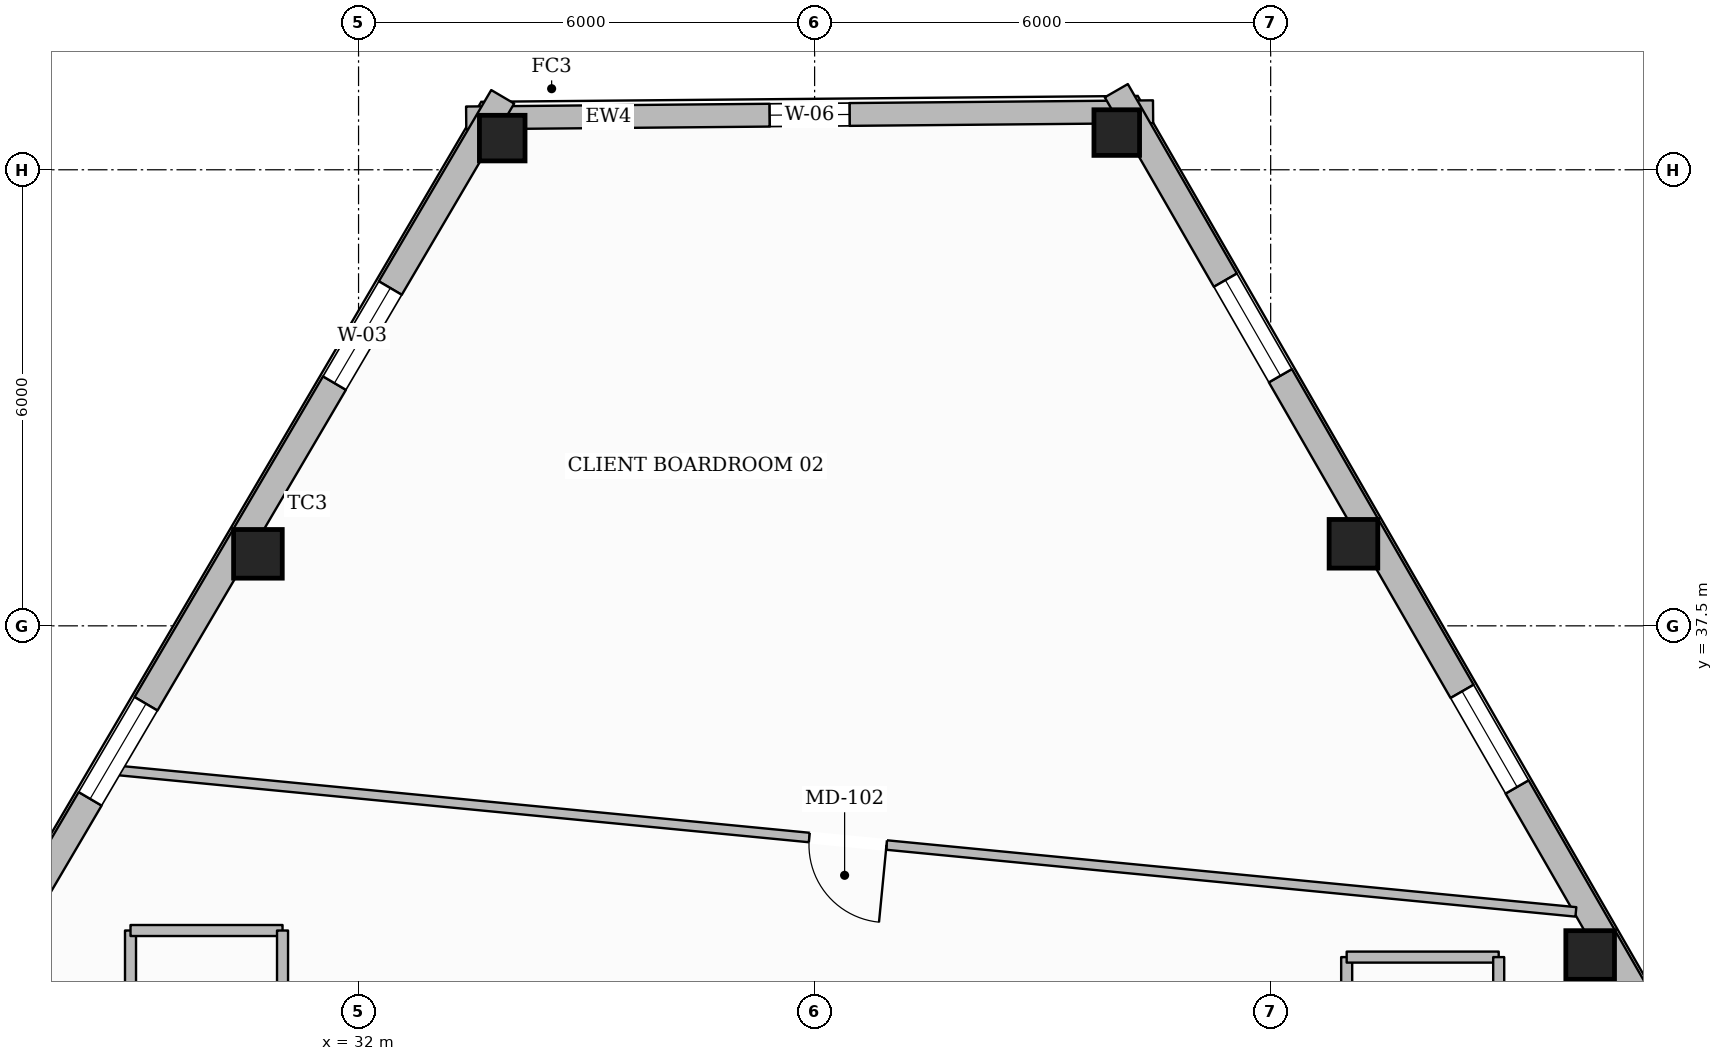
"""IFC4 building model, lengths in metres.
Left out: names, types, materials, properties, quantities, classifications, styles, units other than length and angle.
Written with IfcOpenShell. Run it as: python <this file> out.ifc"""

import sys

from ifc_helpers import new_model, si_unit, direction, frame, frame_2d, origin, origin_2d, place, context, subcontext, project, spatial, rectangle, hollow_rectangle, extrude, element, fill, save


model = new_model("IFC4")
c1 = context("Model", 3, precision=1e-05, world=origin(), true_north=direction((0.0, 1.0)))
c2 = subcontext(c1, "Body", "Model", "MODEL_VIEW")
j1 = project(units=[si_unit("LENGTHUNIT", "METRE"), si_unit("PLANEANGLEUNIT", "RADIAN")], contexts=[c1])
p1 = place(None, origin())
s1 = spatial("IfcSite", under=j1, at=p1, CompositionType="ELEMENT")
p2 = place(p1, origin())
s2 = spatial("IfcBuilding", under=s1, at=p2, CompositionType="ELEMENT")
p3 = place(p2, frame((0.0, 0.0, 215.05)))
s3 = spatial("IfcBuildingStorey", under=s2, at=p3, CompositionType="ELEMENT", Elevation=215.05)
p4 = place(p3, frame((33.89, 43.917, 0.0), z_axis=(0.0, 0.0, 1.0), x_axis=(1.0, 0.0, 0.0)))
e1 = element("IfcColumn", 1, at=p4, inside=s3, PredefinedType="COLUMN", context=c2, shape_type="SweptSolid", body=[
    extrude(hollow_rectangle(XDim=0.6, YDim=0.6, WallThickness=0.028, at=origin_2d()), origin(), (0.0, 0.0, 1.0), 3.6),
])
for number, where, z_axis, x_axis in (
    (2, (30.676, 38.447, 0.0), (0.0, 0.0, 1.0), (1.0, 0.0, 0.0)),
    (3, (48.203, 33.17, 0.0), (0.0, 0.0, 1.0), (1.0, 0.0, 0.0)),
    (4, (45.089, 38.58, 0.0), (0.0, 0.0, 1.0), (1.0, 0.0, 0.0)),
):
    element("IfcColumn", number, at=place(p3, frame(where, z_axis=z_axis, x_axis=x_axis)), inside=s3, PredefinedType="COLUMN", context=c2, shape_type="SweptSolid", body=[
        extrude(hollow_rectangle(XDim=0.64, YDim=0.64, WallThickness=0.028, at=origin_2d()), origin(), (0.0, 0.0, 1.0), 3.6),
    ])
p5 = place(p3, frame((41.975, 43.989, 0.0), z_axis=(0.0, 0.0, 1.0), x_axis=(1.0, 0.0, 0.0)))
e5 = element("IfcColumn", 5, at=p5, inside=s3, PredefinedType="COLUMN", context=c2, shape_type="SweptSolid", body=[
    extrude(hollow_rectangle(XDim=0.6, YDim=0.6, WallThickness=0.028, at=origin_2d()), origin(), (0.0, 0.0, 1.0), 3.6),
])
p6 = place(p3, frame((33.416, 44.182, 0.0), z_axis=(0.0, 0.0, 1.0), x_axis=(0.99995953746, 0.008995745785, 0.0)))
e6 = element("IfcWall", 6, at=p6, inside=s3, PredefinedType="STANDARD", context=c2, shape_type="SweptSolid", body=[
    extrude(rectangle(XDim=9.037, YDim=0.3, at=frame_2d((4.519, 0.0))), origin(), (0.0, 0.0, 1.0), 3.132),
])
p7 = place(p6, frame((3.994, 0.0, 0.65)))
e7 = element("IfcOpeningElement", 7, at=p7, cuts=e6, PredefinedType="OPENING", context=c2, shape_type="SweptSolid", body=[
    extrude(rectangle(XDim=1.05, YDim=1.7, at=frame_2d((0.525, 0.85))), frame((0.0, 0.16, 0.0), z_axis=(0.0, -1.0, 0.0), x_axis=(1.0, 0.0, 0.0)), (0.0, 0.0, 1.0), 0.32),
])
p8 = place(p3, frame((14.13, 10.825, 0.0), z_axis=(0.0, 0.0, 1.0), x_axis=(0.506658543763, 0.862146808863, 0.0)))
e8 = element("IfcWall", 8, at=p8, inside=s3, PredefinedType="STANDARD", context=c2, shape_type="SweptSolid", body=[
    extrude(rectangle(XDim=39.014, YDim=0.35, at=frame_2d((19.507, 0.0))), origin(), (0.0, 0.0, 1.0), 3.132),
])
p9 = place(p8, frame((9.354, 0.0, 0.0)))
e9 = element("IfcOpeningElement", 9, at=p9, cuts=e8, PredefinedType="OPENING", context=c2, shape_type="SweptSolid", body=[
    extrude(rectangle(XDim=1.0, YDim=2.2, at=frame_2d((0.5, 1.1))), frame((0.0, 0.185, 0.0), z_axis=(0.0, -1.0, 0.0), x_axis=(1.0, 0.0, 0.0)), (0.0, 0.0, 1.0), 0.37),
])
p10 = place(p8, frame((34.645, 0.0, 0.65)))
e10 = element("IfcOpeningElement", 10, at=p10, cuts=e8, PredefinedType="OPENING", context=c2, shape_type="SweptSolid", body=[
    extrude(rectangle(XDim=1.45, YDim=1.75, at=frame_2d((0.725, 0.875))), frame((0.0, 0.185, 0.0), z_axis=(0.0, -1.0, 0.0), x_axis=(1.0, 0.0, 0.0)), (0.0, 0.0, 1.0), 0.37),
])
p11 = place(p8, frame((28.301, 0.0, 0.65)))
e11 = element("IfcOpeningElement", 11, at=p11, cuts=e8, PredefinedType="OPENING", context=c2, shape_type="SweptSolid", body=[
    extrude(rectangle(XDim=1.45, YDim=1.75, at=frame_2d((0.725, 0.875))), frame((0.0, 0.185, 0.0), z_axis=(0.0, -1.0, 0.0), x_axis=(1.0, 0.0, 0.0)), (0.0, 0.0, 1.0), 0.37),
])
p12 = place(p8, frame((21.958, 0.0, 0.65)))
e12 = element("IfcOpeningElement", 12, at=p12, cuts=e8, PredefinedType="OPENING", context=c2, shape_type="SweptSolid", body=[
    extrude(rectangle(XDim=1.45, YDim=1.75, at=frame_2d((0.725, 0.875))), frame((0.0, 0.185, 0.0), z_axis=(0.0, -1.0, 0.0), x_axis=(1.0, 0.0, 0.0)), (0.0, 0.0, 1.0), 0.37),
])
p13 = place(p8, frame((2.926, 0.0, 0.65)))
e13 = element("IfcOpeningElement", 13, at=p13, cuts=e8, PredefinedType="OPENING", context=c2, shape_type="SweptSolid", body=[
    extrude(rectangle(XDim=1.45, YDim=1.75, at=frame_2d((0.725, 0.875))), frame((0.0, 0.185, 0.0), z_axis=(0.0, -1.0, 0.0), x_axis=(1.0, 0.0, 0.0)), (0.0, 0.0, 1.0), 0.37),
])
p14 = place(p3, frame((41.969, 44.54, 0.0), z_axis=(0.0, 0.0, 1.0), x_axis=(0.498884596562, -0.866668425243, 0.0)))
e14 = element("IfcWall", 14, at=p14, inside=s3, PredefinedType="STANDARD", context=c2, shape_type="SweptSolid", body=[
    extrude(rectangle(XDim=38.412, YDim=0.35, at=frame_2d((19.206, 0.0))), origin(), (0.0, 0.0, 1.0), 3.132),
])
p15 = place(p14, frame((34.087, 0.0, 0.65)))
e15 = element("IfcOpeningElement", 15, at=p15, cuts=e14, PredefinedType="OPENING", context=c2, shape_type="SweptSolid", body=[
    extrude(rectangle(XDim=1.45, YDim=1.75, at=frame_2d((0.725, 0.875))), frame((0.0, 0.185, 0.0), z_axis=(0.0, -1.0, 0.0), x_axis=(1.0, 0.0, 0.0)), (0.0, 0.0, 1.0), 0.37),
])
p16 = place(p14, frame((27.845, 0.0, 0.65)))
e16 = element("IfcOpeningElement", 16, at=p16, cuts=e14, PredefinedType="OPENING", context=c2, shape_type="SweptSolid", body=[
    extrude(rectangle(XDim=1.45, YDim=1.75, at=frame_2d((0.725, 0.875))), frame((0.0, 0.185, 0.0), z_axis=(0.0, -1.0, 0.0), x_axis=(1.0, 0.0, 0.0)), (0.0, 0.0, 1.0), 0.37),
])
p17 = place(p14, frame((21.603, 0.0, 0.65)))
e17 = element("IfcOpeningElement", 17, at=p17, cuts=e14, PredefinedType="OPENING", context=c2, shape_type="SweptSolid", body=[
    extrude(rectangle(XDim=1.45, YDim=1.75, at=frame_2d((0.725, 0.875))), frame((0.0, 0.185, 0.0), z_axis=(0.0, -1.0, 0.0), x_axis=(1.0, 0.0, 0.0)), (0.0, 0.0, 1.0), 0.37),
])
p18 = place(p14, frame((9.119, 0.0, 0.65)))
e18 = element("IfcOpeningElement", 18, at=p18, cuts=e14, PredefinedType="OPENING", context=c2, shape_type="SweptSolid", body=[
    extrude(rectangle(XDim=1.45, YDim=1.75, at=frame_2d((0.725, 0.875))), frame((0.0, 0.185, 0.0), z_axis=(0.0, -1.0, 0.0), x_axis=(1.0, 0.0, 0.0)), (0.0, 0.0, 1.0), 0.37),
])
p19 = place(p14, frame((2.876, 0.0, 0.65)))
e19 = element("IfcOpeningElement", 19, at=p19, cuts=e14, PredefinedType="OPENING", context=c2, shape_type="SweptSolid", body=[
    extrude(rectangle(XDim=1.45, YDim=1.75, at=frame_2d((0.725, 0.875))), frame((0.0, 0.185, 0.0), z_axis=(0.0, -1.0, 0.0), x_axis=(1.0, 0.0, 0.0)), (0.0, 0.0, 1.0), 0.37),
])
p20 = place(p3, frame((29.0, 25.02, 0.0), z_axis=(0.0, 0.0, 1.0), x_axis=(0.0, 1.0, 0.0)))
e20 = element("IfcWall", 20, at=p20, inside=s3, PredefinedType="PARTITIONING", context=c2, shape_type="SweptSolid", body=[
    extrude(rectangle(XDim=8.472, YDim=0.145, at=frame_2d((4.236, 0.0))), origin(), (0.0, 0.0, 1.0), 3.6),
])
p21 = place(p20, frame((2.347, 0.0, 0.0)))
e21 = element("IfcOpeningElement", 21, at=p21, cuts=e20, PredefinedType="OPENING", context=c2, shape_type="SweptSolid", body=[
    extrude(rectangle(XDim=0.98, YDim=2.15, at=frame_2d((0.49, 1.075))), frame((0.0, 0.083, 0.0), z_axis=(0.0, -1.0, 0.0), x_axis=(1.0, 0.0, 0.0)), (0.0, 0.0, 1.0), 0.165),
])
p22 = place(p3, frame((29.0, 33.492, 0.0), z_axis=(0.0, 0.0, 1.0), x_axis=(1.0, 0.0, 0.0)))
e22 = element("IfcWall", 22, at=p22, inside=s3, PredefinedType="PARTITIONING", context=c2, shape_type="SweptSolid", body=[
    extrude(rectangle(XDim=2.0, YDim=0.145, at=frame_2d((1.0, 0.0))), origin(), (0.0, 0.0, 1.0), 3.6),
])
p23 = place(p3, frame((31.0, 33.492, 0.0), z_axis=(0.0, 0.0, 1.0), x_axis=(0.0, -1.0, 0.0)))
e23 = element("IfcWall", 23, at=p23, inside=s3, PredefinedType="PARTITIONING", context=c2, shape_type="SweptSolid", body=[
    extrude(rectangle(XDim=8.472, YDim=0.145, at=frame_2d((4.236, 0.0))), origin(), (0.0, 0.0, 1.0), 3.6),
])
p24 = place(p3, frame((45.0, 25.02, 0.0), z_axis=(0.0, 0.0, 1.0), x_axis=(0.0, 1.0, 0.0)))
e24 = element("IfcWall", 24, at=p24, inside=s3, PredefinedType="PARTITIONING", context=c2, shape_type="SweptSolid", body=[
    extrude(rectangle(XDim=8.122, YDim=0.145, at=frame_2d((4.061, 0.0))), origin(), (0.0, 0.0, 1.0), 3.141),
])
p25 = place(p24, frame((3.361, 0.0, 0.0)))
e25 = element("IfcOpeningElement", 25, at=p25, cuts=e24, PredefinedType="OPENING", context=c2, shape_type="SweptSolid", body=[
    extrude(rectangle(XDim=1.4, YDim=2.2, at=frame_2d((0.7, 1.1))), frame((0.0, 0.083, 0.0), z_axis=(0.0, -1.0, 0.0), x_axis=(1.0, 0.0, 0.0)), (0.0, 0.0, 1.0), 0.165),
])
p26 = place(p3, frame((45.0, 33.142, 0.0), z_axis=(0.0, 0.0, 1.0), x_axis=(1.0, 0.0, 0.0)))
e26 = element("IfcWall", 26, at=p26, inside=s3, PredefinedType="PARTITIONING", context=c2, shape_type="SweptSolid", body=[
    extrude(rectangle(XDim=2.0, YDim=0.145, at=frame_2d((1.0, 0.0))), origin(), (0.0, 0.0, 1.0), 3.6),
])
p27 = place(p3, frame((47.0, 33.142, 0.0), z_axis=(0.0, 0.0, 1.0), x_axis=(0.0, -1.0, 0.0)))
e27 = element("IfcWall", 27, at=p27, inside=s3, PredefinedType="PARTITIONING", context=c2, shape_type="SweptSolid", body=[
    extrude(rectangle(XDim=8.122, YDim=0.145, at=frame_2d((4.061, 0.0))), origin(), (0.0, 0.0, 1.0), 3.141),
])
p28 = place(p3, frame((48.015, 33.737, 0.0), z_axis=(0.0, 0.0, 1.0), x_axis=(-0.995325183531, 0.096580427779, 0.0)))
e28 = element("IfcWall", 28, at=p28, inside=s3, PredefinedType="PARTITIONING", context=c2, shape_type="SweptSolid", body=[
    extrude(rectangle(XDim=19.244, YDim=0.125, at=frame_2d((9.622, 0.0))), origin(), (0.0, 0.0, 1.0), 3.6),
])
p29 = place(p28, frame((9.112, 0.0, 0.0)))
e29 = element("IfcOpeningElement", 29, at=p29, cuts=e28, PredefinedType="OPENING", context=c2, shape_type="SweptSolid", body=[
    extrude(rectangle(XDim=1.02, YDim=2.15, at=frame_2d((0.51, 1.075))), frame((0.0, 0.073, 0.0), z_axis=(0.0, -1.0, 0.0), x_axis=(1.0, 0.0, 0.0)), (0.0, 0.0, 1.0), 0.145),
])
p30 = place(p10, origin())
e30 = element("IfcWindow", 30, at=p30, inside=s3, PartitioningType="SINGLE_PANEL", PredefinedType="WINDOW", context=c2, shape_type="SweptSolid", body=[
    extrude(rectangle(XDim=1.45, YDim=1.75, at=frame_2d((0.725, 0.875))), frame((0.0, 0.03, 0.0), z_axis=(0.0, -1.0, 0.0), x_axis=(1.0, 0.0, 0.0)), (0.0, 0.0, 1.0), 0.06),
])
fill(e10, e30)
p31 = place(p11, origin())
e31 = element("IfcWindow", 31, at=p31, inside=s3, PartitioningType="SINGLE_PANEL", PredefinedType="WINDOW", context=c2, shape_type="SweptSolid", body=[
    extrude(rectangle(XDim=1.45, YDim=1.75, at=frame_2d((0.725, 0.875))), frame((0.0, 0.03, 0.0), z_axis=(0.0, -1.0, 0.0), x_axis=(1.0, 0.0, 0.0)), (0.0, 0.0, 1.0), 0.06),
])
fill(e11, e31)
p32 = place(p18, origin())
e32 = element("IfcWindow", 32, at=p32, inside=s3, PartitioningType="SINGLE_PANEL", PredefinedType="WINDOW", context=c2, shape_type="SweptSolid", body=[
    extrude(rectangle(XDim=1.45, YDim=1.75, at=frame_2d((0.725, 0.875))), frame((0.0, 0.03, 0.0), z_axis=(0.0, -1.0, 0.0), x_axis=(1.0, 0.0, 0.0)), (0.0, 0.0, 1.0), 0.06),
])
fill(e18, e32)
p33 = place(p19, origin())
e33 = element("IfcWindow", 33, at=p33, inside=s3, PartitioningType="SINGLE_PANEL", PredefinedType="WINDOW", context=c2, shape_type="SweptSolid", body=[
    extrude(rectangle(XDim=1.45, YDim=1.75, at=frame_2d((0.725, 0.875))), frame((0.0, 0.03, 0.0), z_axis=(0.0, -1.0, 0.0), x_axis=(1.0, 0.0, 0.0)), (0.0, 0.0, 1.0), 0.06),
])
fill(e19, e33)
p34 = place(p7, origin())
e34 = element("IfcWindow", 34, at=p34, inside=s3, PartitioningType="SINGLE_PANEL", PredefinedType="WINDOW", context=c2, shape_type="SweptSolid", body=[
    extrude(rectangle(XDim=1.05, YDim=1.7, at=frame_2d((0.525, 0.85))), frame((0.0, 0.03, 0.0), z_axis=(0.0, -1.0, 0.0), x_axis=(1.0, 0.0, 0.0)), (0.0, 0.0, 1.0), 0.06),
])
fill(e7, e34)
p35 = place(p29, origin())
e35 = element("IfcDoor", 35, at=p35, inside=s3, OperationType="SINGLE_SWING_LEFT", PredefinedType="DOOR", context=c2, shape_type="SweptSolid", body=[
    extrude(rectangle(XDim=1.02, YDim=2.15, at=frame_2d((0.51, 1.075))), frame((0.0, 0.025, 0.0), z_axis=(0.0, -1.0, 0.0), x_axis=(1.0, 0.0, 0.0)), (0.0, 0.0, 1.0), 0.05),
])
fill(e29, e35)
save(model, sys.argv[1])
